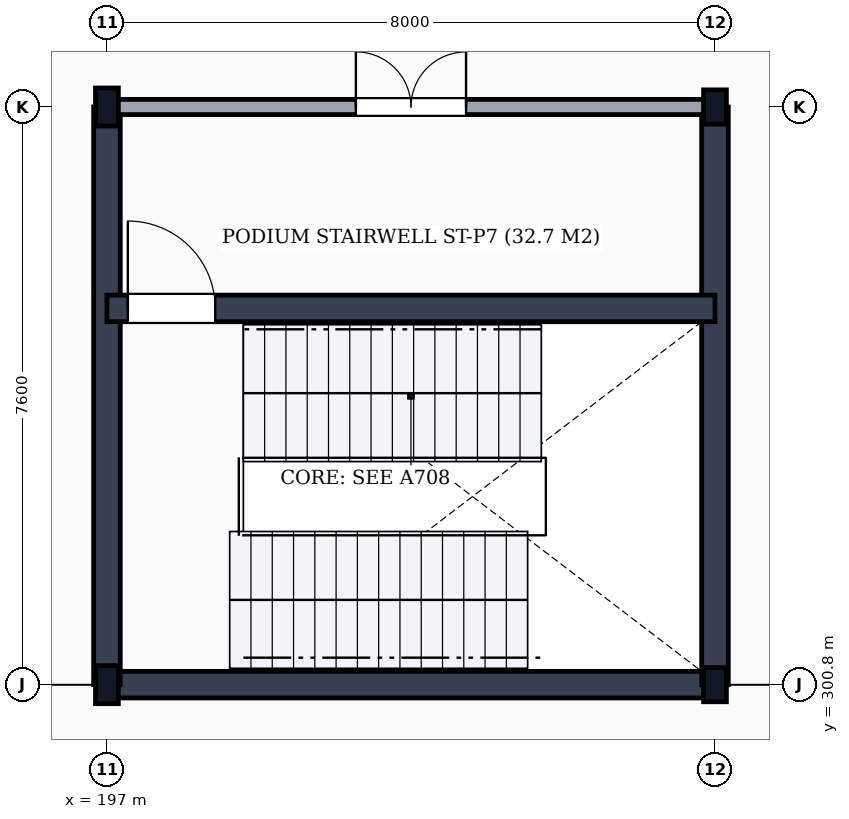
"""IFC4 building model, lengths in metres.
Left out: names, types, materials, properties, quantities, classifications, styles, units other than length and angle.
Written with IfcOpenShell. Run it as: python <this file> out.ifc"""

import sys

from ifc_helpers import new_model, si_unit, direction, frame, frame_2d, origin, origin_2d, place, context, subcontext, project, spatial, rectangle, i_section, extrude, element, fill, save


model = new_model("IFC4")
c1 = context("Model", 3, precision=1e-05, world=origin(), true_north=direction((0.0, 1.0)))
c2 = subcontext(c1, "Body", "Model", "MODEL_VIEW")
j1 = project(units=[si_unit("LENGTHUNIT", "METRE"), si_unit("PLANEANGLEUNIT", "RADIAN")], contexts=[c1])
p1 = place(None, origin())
s1 = spatial("IfcSite", under=j1, at=p1, CompositionType="ELEMENT")
p2 = place(p1, origin())
s2 = spatial("IfcBuilding", under=s1, at=p2, CompositionType="ELEMENT")
p3 = place(p2, origin())
s3 = spatial("IfcBuildingStorey", under=s2, at=p3, CompositionType="ELEMENT", Elevation=0.0)
for number, where, z_axis, x_axis in (
    (1, (197.0, 300.8, 0.0), (0.0, 0.0, 1.0), (1.0, 0.0, 0.0)),
    (2, (197.0, 308.4, 0.0), (0.0, 0.0, 1.0), (1.0, 0.0, 0.0)),
):
    element("IfcColumn", number, at=place(p3, frame(where, z_axis=z_axis, x_axis=x_axis)), inside=s3, PredefinedType="COLUMN", context=c2, shape_type="SweptSolid", body=[
        extrude(i_section(OverallWidth=0.3, OverallDepth=0.5, WebThickness=0.014, FlangeThickness=0.028, FilletRadius=0.027, at=origin_2d()), origin(), (0.0, 0.0, 1.0), 5.4),
    ])
for number, where, z_axis, x_axis in (
    (3, (205.0, 300.8, 0.0), (0.0, 0.0, 1.0), (1.0, 0.0, 0.0)),
    (4, (205.0, 308.4, 0.0), (0.0, 0.0, 1.0), (1.0, 0.0, 0.0)),
):
    element("IfcColumn", number, at=place(p3, frame(where, z_axis=z_axis, x_axis=x_axis)), inside=s3, PredefinedType="COLUMN", context=c2, shape_type="SweptSolid", body=[
        extrude(i_section(OverallWidth=0.3, OverallDepth=0.45, WebThickness=0.014, FlangeThickness=0.026, FilletRadius=0.027, at=origin_2d()), origin(), (0.0, 0.0, 1.0), 5.4),
    ])
p4 = place(p3, frame((197.0, 300.8, 0.0), z_axis=(0.0, 0.0, 1.0), x_axis=(1.0, 0.0, 0.0)))
e5 = element("IfcWall", 5, at=p4, inside=s3, PredefinedType="SHEAR", context=c2, shape_type="SweptSolid", body=[
    extrude(rectangle(XDim=8.0, YDim=0.35, at=frame_2d((4.0, 0.0))), origin(), (0.0, 0.0, 1.0), 5.14),
])
for number, where, z_axis, x_axis in (
    (6, (197.0, 300.8, 0.0), (0.0, 0.0, 1.0), (0.0, 1.0, 0.0)),
    (7, (205.0, 300.8, 0.0), (0.0, 0.0, 1.0), (0.0, 1.0, 0.0)),
):
    element("IfcWall", number, at=place(p3, frame(where, z_axis=z_axis, x_axis=x_axis)), inside=s3, PredefinedType="SHEAR", context=c2, shape_type="SweptSolid", body=[
        extrude(rectangle(XDim=7.6, YDim=0.35, at=frame_2d((3.8, 0.0))), origin(), (0.0, 0.0, 1.0), 5.14),
    ])
p5 = place(p3, frame((197.0, 305.75, 0.0), z_axis=(0.0, 0.0, 1.0), x_axis=(1.0, 0.0, 0.0)))
e8 = element("IfcWall", 8, at=p5, inside=s3, PredefinedType="SHEAR", context=c2, shape_type="SweptSolid", body=[
    extrude(rectangle(XDim=8.0, YDim=0.35, at=frame_2d((4.0, 0.0))), origin(), (0.0, 0.0, 1.0), 5.14),
])
p6 = place(p5, frame((0.275, 0.0, 0.0)))
e9 = element("IfcOpeningElement", 9, at=p6, cuts=e8, PredefinedType="OPENING", context=c2, shape_type="SweptSolid", body=[
    extrude(rectangle(XDim=1.15, YDim=2.15, at=frame_2d((0.575, 1.075))), frame((0.0, 0.19, 0.0), z_axis=(0.0, -1.0, 0.0), x_axis=(1.0, 0.0, 0.0)), (0.0, 0.0, 1.0), 0.38),
])
p7 = place(p3, frame((197.0, 308.4, 0.0), z_axis=(0.0, 0.0, 1.0), x_axis=(1.0, 0.0, 0.0)))
e10 = element("IfcWall", 10, at=p7, inside=s3, PredefinedType="PARTITIONING", context=c2, shape_type="SweptSolid", body=[
    extrude(rectangle(XDim=8.0, YDim=0.2, at=frame_2d((4.0, 0.0))), origin(), (0.0, 0.0, 1.0), 4.688),
])
p8 = place(p7, frame((3.275, 0.0, 0.0)))
e11 = element("IfcOpeningElement", 11, at=p8, cuts=e10, PredefinedType="OPENING", context=c2, shape_type="SweptSolid", body=[
    extrude(rectangle(XDim=1.45, YDim=2.2, at=frame_2d((0.725, 1.1))), frame((0.0, 0.115, 0.0), z_axis=(0.0, -1.0, 0.0), x_axis=(1.0, 0.0, 0.0)), (0.0, 0.0, 1.0), 0.23),
])
p9 = place(p6, origin())
e12 = element("IfcDoor", 12, at=p9, inside=s3, OperationType="SINGLE_SWING_LEFT", PredefinedType="DOOR", context=c2, shape_type="SweptSolid", body=[
    extrude(rectangle(XDim=1.15, YDim=2.15, at=frame_2d((0.575, 1.075))), frame((0.0, 0.025, 0.0), z_axis=(0.0, -1.0, 0.0), x_axis=(1.0, 0.0, 0.0)), (0.0, 0.0, 1.0), 0.05),
])
fill(e9, e12)
p10 = place(p8, origin())
e13 = element("IfcDoor", 13, at=p10, inside=s3, OperationType="DOUBLE_DOOR_SINGLE_SWING", PredefinedType="DOOR", context=c2, shape_type="SweptSolid", body=[
    extrude(rectangle(XDim=1.45, YDim=2.2, at=frame_2d((0.725, 1.1))), frame((0.0, 0.025, 0.0), z_axis=(0.0, -1.0, 0.0), x_axis=(1.0, 0.0, 0.0)), (0.0, 0.0, 1.0), 0.05),
])
fill(e11, e13)
save(model, sys.argv[1])
